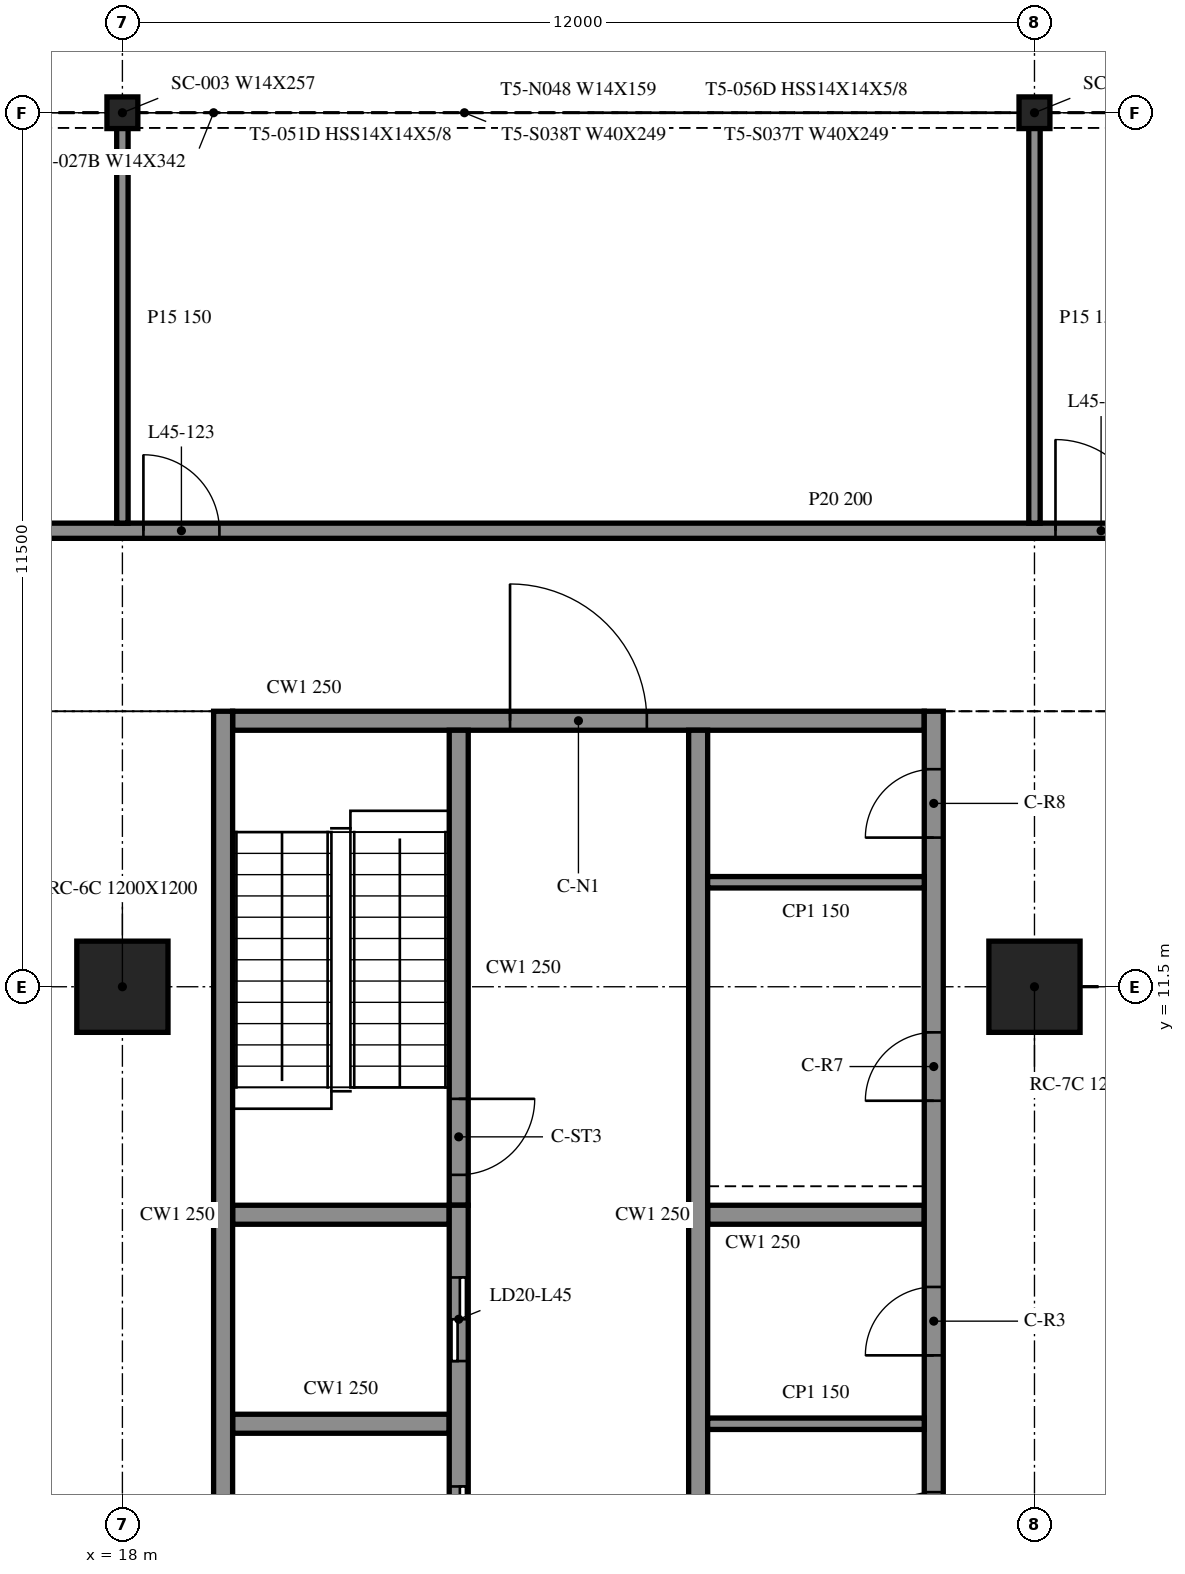
"""IFC4 building model, lengths in metres.
Left out: names, types, materials, properties, quantities, classifications, styles, units other than length and angle.
Written with IfcOpenShell. Run it as: python <this file> out.ifc"""

import sys

from ifc_helpers import new_model, si_unit, direction, frame, frame_2d, origin, origin_2d, place, context, subcontext, project, spatial, rectangle, i_section, extrude, element, fill, save


model = new_model("IFC4")
c1 = context("Model", 3, precision=1e-05, world=origin(), true_north=direction((0.0, 1.0)))
c2 = subcontext(c1, "Body", "Model", "MODEL_VIEW")
j1 = project(units=[si_unit("LENGTHUNIT", "METRE"), si_unit("PLANEANGLEUNIT", "RADIAN")], contexts=[c1])
p1 = place(None, origin())
s1 = spatial("IfcSite", under=j1, at=p1, CompositionType="ELEMENT")
p2 = place(p1, origin())
s2 = spatial("IfcBuilding", under=s1, at=p2, CompositionType="ELEMENT")
p3 = place(p2, frame((0.0, 0.0, 189.6)))
s3 = spatial("IfcBuildingStorey", under=s2, at=p3, CompositionType="ELEMENT", Elevation=189.6)
for number, where, z_axis, x_axis in (
    (1, (18.0, 11.5, -0.4), (0.0, 0.0, 1.0), (1.0, 0.0, 0.0)),
    (2, (30.0, 11.5, -0.4), (0.0, 0.0, 1.0), (1.0, 0.0, 0.0)),
):
    element("IfcColumn", number, at=place(p3, frame(where, z_axis=z_axis, x_axis=x_axis)), inside=s3, PredefinedType="COLUMN", context=c2, shape_type="SweptSolid", body=[
        extrude(rectangle(XDim=1.2, YDim=1.2, at=origin_2d()), origin(), (0.0, 0.0, 1.0), 4.36),
    ])
for number, where, z_axis, x_axis in (
    (3, (30.0, 23.0, -0.4), (0.0, 0.0, 1.0), (1.0, 0.0, 0.0)),
    (4, (18.0, 23.0, -0.4), (0.0, 0.0, 1.0), (1.0, 0.0, 0.0)),
):
    element("IfcColumn", number, at=place(p3, frame(where, z_axis=z_axis, x_axis=x_axis)), inside=s3, PredefinedType="COLUMN", context=c2, shape_type="SweptSolid", body=[
        extrude(i_section(OverallWidth=0.406, OverallDepth=0.417, WebThickness=0.03, FlangeThickness=0.048, at=origin_2d()), origin(), (0.0, 0.0, 1.0), 4.36),
    ])
p4 = place(p3, frame((19.325, 15.125, 0.0), z_axis=(0.0, 0.0, 1.0), x_axis=(0.0, -1.0, 0.0)))
e5 = element("IfcWall", 5, at=p4, inside=s3, PredefinedType="SOLIDWALL", context=c2, shape_type="SweptSolid", body=[
    extrude(rectangle(XDim=24.25, YDim=0.25, at=frame_2d((12.125, 0.0))), origin(), (0.0, 0.0, 1.0), 3.96),
])
p5 = place(p3, frame((28.675, -9.125, 0.0), z_axis=(0.0, 0.0, 1.0), x_axis=(0.0, 1.0, 0.0)))
e6 = element("IfcWall", 6, at=p5, inside=s3, PredefinedType="SOLIDWALL", context=c2, shape_type="SweptSolid", body=[
    extrude(rectangle(XDim=24.25, YDim=0.25, at=frame_2d((12.125, 0.0))), origin(), (0.0, 0.0, 1.0), 3.96),
])
p6 = place(p5, frame((13.075, 0.0, 0.0)))
e7 = element("IfcOpeningElement", 7, at=p6, cuts=e6, PredefinedType="OPENING", context=c2, shape_type="SweptSolid", body=[
    extrude(rectangle(XDim=0.9, YDim=2.1, at=frame_2d((0.45, 1.05))), frame((0.0, 0.135, 0.0), z_axis=(0.0, -1.0, 0.0), x_axis=(1.0, 0.0, 0.0)), (0.0, 0.0, 1.0), 0.27),
])
p7 = place(p5, frame((15.775, 0.0, 0.0)))
e8 = element("IfcOpeningElement", 8, at=p7, cuts=e6, PredefinedType="OPENING", context=c2, shape_type="SweptSolid", body=[
    extrude(rectangle(XDim=0.9, YDim=2.1, at=frame_2d((0.45, 1.05))), frame((0.0, 0.135, 0.0), z_axis=(0.0, -1.0, 0.0), x_axis=(1.0, 0.0, 0.0)), (0.0, 0.0, 1.0), 0.27),
])
p8 = place(p5, frame((19.125, 0.0, 0.0)))
e9 = element("IfcOpeningElement", 9, at=p8, cuts=e6, PredefinedType="OPENING", context=c2, shape_type="SweptSolid", body=[
    extrude(rectangle(XDim=0.9, YDim=2.1, at=frame_2d((0.45, 1.05))), frame((0.0, 0.135, 0.0), z_axis=(0.0, -1.0, 0.0), x_axis=(1.0, 0.0, 0.0)), (0.0, 0.0, 1.0), 0.27),
])
p9 = place(p5, frame((22.587, 0.0, 0.0)))
e10 = element("IfcOpeningElement", 10, at=p9, cuts=e6, PredefinedType="OPENING", context=c2, shape_type="SweptSolid", body=[
    extrude(rectangle(XDim=0.9, YDim=2.1, at=frame_2d((0.45, 1.05))), frame((0.0, 0.135, 0.0), z_axis=(0.0, -1.0, 0.0), x_axis=(1.0, 0.0, 0.0)), (0.0, 0.0, 1.0), 0.27),
])
p10 = place(p3, frame((19.45, 15.0, 0.0), z_axis=(0.0, 0.0, 1.0), x_axis=(1.0, 0.0, 0.0)))
e11 = element("IfcWall", 11, at=p10, inside=s3, PredefinedType="SOLIDWALL", context=c2, shape_type="SweptSolid", body=[
    extrude(rectangle(XDim=9.1, YDim=0.25, at=frame_2d((4.55, 0.0))), origin(), (0.0, 0.0, 1.0), 3.96),
])
p11 = place(p10, frame((3.65, 0.0, 0.0)))
e12 = element("IfcOpeningElement", 12, at=p11, cuts=e11, PredefinedType="OPENING", context=c2, shape_type="SweptSolid", body=[
    extrude(rectangle(XDim=1.8, YDim=2.1, at=frame_2d((0.9, 1.05))), frame((0.0, 0.135, 0.0), z_axis=(0.0, -1.0, 0.0), x_axis=(1.0, 0.0, 0.0)), (0.0, 0.0, 1.0), 0.27),
])
p12 = place(p3, frame((22.425, -8.875, 0.0), z_axis=(0.0, 0.0, 1.0), x_axis=(0.0, 1.0, 0.0)))
e13 = element("IfcWall", 13, at=p12, inside=s3, PredefinedType="SOLIDWALL", context=c2, shape_type="SweptSolid", body=[
    extrude(rectangle(XDim=17.5, YDim=0.25, at=frame_2d((8.75, 0.0))), origin(), (0.0, 0.0, 1.0), 3.96),
])
p13 = place(p12, frame((7.2, 0.0, 0.0)))
e14 = element("IfcOpeningElement", 14, at=p13, cuts=e13, PredefinedType="OPENING", context=c2, shape_type="SweptSolid", body=[
    extrude(rectangle(XDim=1.1, YDim=2.1, at=frame_2d((0.55, 1.05))), frame((0.0, 0.135, 0.0), z_axis=(0.0, -1.0, 0.0), x_axis=(1.0, 0.0, 0.0)), (0.0, 0.0, 1.0), 0.27),
])
p14 = place(p12, frame((9.95, 0.0, 0.0)))
e15 = element("IfcOpeningElement", 15, at=p14, cuts=e13, PredefinedType="OPENING", context=c2, shape_type="SweptSolid", body=[
    extrude(rectangle(XDim=1.1, YDim=2.1, at=frame_2d((0.55, 1.05))), frame((0.0, 0.135, 0.0), z_axis=(0.0, -1.0, 0.0), x_axis=(1.0, 0.0, 0.0)), (0.0, 0.0, 1.0), 0.27),
])
p15 = place(p12, frame((12.7, 0.0, 0.0)))
e16 = element("IfcOpeningElement", 16, at=p15, cuts=e13, PredefinedType="OPENING", context=c2, shape_type="SweptSolid", body=[
    extrude(rectangle(XDim=1.1, YDim=2.1, at=frame_2d((0.55, 1.05))), frame((0.0, 0.135, 0.0), z_axis=(0.0, -1.0, 0.0), x_axis=(1.0, 0.0, 0.0)), (0.0, 0.0, 1.0), 0.27),
])
p16 = place(p12, frame((15.45, 0.0, 0.0)))
e17 = element("IfcOpeningElement", 17, at=p16, cuts=e13, PredefinedType="OPENING", context=c2, shape_type="SweptSolid", body=[
    extrude(rectangle(XDim=1.1, YDim=2.1, at=frame_2d((0.55, 1.05))), frame((0.0, 0.135, 0.0), z_axis=(0.0, -1.0, 0.0), x_axis=(1.0, 0.0, 0.0)), (0.0, 0.0, 1.0), 0.27),
])
p17 = place(p12, frame((0.512, 0.0, 0.0)))
e18 = element("IfcOpeningElement", 18, at=p17, cuts=e13, PredefinedType="OPENING", context=c2, shape_type="SweptSolid", body=[
    extrude(rectangle(XDim=0.9, YDim=2.1, at=frame_2d((0.45, 1.05))), frame((0.0, 0.135, 0.0), z_axis=(0.0, -1.0, 0.0), x_axis=(1.0, 0.0, 0.0)), (0.0, 0.0, 1.0), 0.27),
])
p18 = place(p12, frame((2.55, 0.0, 0.0)))
e19 = element("IfcOpeningElement", 19, at=p18, cuts=e13, PredefinedType="OPENING", context=c2, shape_type="SweptSolid", body=[
    extrude(rectangle(XDim=0.9, YDim=2.1, at=frame_2d((0.45, 1.05))), frame((0.0, 0.135, 0.0), z_axis=(0.0, -1.0, 0.0), x_axis=(1.0, 0.0, 0.0)), (0.0, 0.0, 1.0), 0.27),
])
p19 = place(p12, frame((4.587, 0.0, 0.0)))
e20 = element("IfcOpeningElement", 20, at=p19, cuts=e13, PredefinedType="OPENING", context=c2, shape_type="SweptSolid", body=[
    extrude(rectangle(XDim=0.9, YDim=2.1, at=frame_2d((0.45, 1.05))), frame((0.0, 0.135, 0.0), z_axis=(0.0, -1.0, 0.0), x_axis=(1.0, 0.0, 0.0)), (0.0, 0.0, 1.0), 0.27),
])
p20 = place(p3, frame((22.425, 14.875, 0.0), z_axis=(0.0, 0.0, 1.0), x_axis=(0.0, -1.0, 0.0)))
e21 = element("IfcWall", 21, at=p20, inside=s3, PredefinedType="SOLIDWALL", context=c2, shape_type="SweptSolid", body=[
    extrude(rectangle(XDim=6.25, YDim=0.25, at=frame_2d((3.125, 0.0))), origin(), (0.0, 0.0, 1.0), 3.96),
])
p21 = place(p20, frame((4.85, 0.0, 0.0)))
e22 = element("IfcOpeningElement", 22, at=p21, cuts=e21, PredefinedType="OPENING", context=c2, shape_type="SweptSolid", body=[
    extrude(rectangle(XDim=1.0, YDim=2.1, at=frame_2d((0.5, 1.05))), frame((0.0, 0.135, 0.0), z_axis=(0.0, -1.0, 0.0), x_axis=(1.0, 0.0, 0.0)), (0.0, 0.0, 1.0), 0.27),
])
p22 = place(p3, frame((25.575, 14.875, 0.0), z_axis=(0.0, 0.0, 1.0), x_axis=(0.0, -1.0, 0.0)))
e23 = element("IfcWall", 23, at=p22, inside=s3, PredefinedType="SOLIDWALL", context=c2, shape_type="SweptSolid", body=[
    extrude(rectangle(XDim=17.5, YDim=0.25, at=frame_2d((8.75, 0.0))), origin(), (0.0, 0.0, 1.0), 3.96),
])
p23 = place(p22, frame((15.45, 0.0, 0.0)))
e24 = element("IfcOpeningElement", 24, at=p23, cuts=e23, PredefinedType="OPENING", context=c2, shape_type="SweptSolid", body=[
    extrude(rectangle(XDim=1.1, YDim=2.1, at=frame_2d((0.55, 1.05))), frame((0.0, 0.135, 0.0), z_axis=(0.0, -1.0, 0.0), x_axis=(1.0, 0.0, 0.0)), (0.0, 0.0, 1.0), 0.27),
])
p24 = place(p22, frame((12.8, 0.0, 0.0)))
e25 = element("IfcOpeningElement", 25, at=p24, cuts=e23, PredefinedType="OPENING", context=c2, shape_type="SweptSolid", body=[
    extrude(rectangle(XDim=0.9, YDim=2.1, at=frame_2d((0.45, 1.05))), frame((0.0, 0.135, 0.0), z_axis=(0.0, -1.0, 0.0), x_axis=(1.0, 0.0, 0.0)), (0.0, 0.0, 1.0), 0.27),
])
for number, where, z_axis, x_axis in (
    (26, (19.45, 5.75, 0.0), (0.0, 0.0, 1.0), (1.0, 0.0, 0.0)),
    (27, (19.45, 8.5, 0.0), (0.0, 0.0, 1.0), (1.0, 0.0, 0.0)),
    (28, (25.7, 8.5, 0.0), (0.0, 0.0, 1.0), (1.0, 0.0, 0.0)),
):
    element("IfcWall", number, at=place(p3, frame(where, z_axis=z_axis, x_axis=x_axis)), inside=s3, PredefinedType="SOLIDWALL", context=c2, shape_type="SweptSolid", body=[
        extrude(rectangle(XDim=2.85, YDim=0.25, at=frame_2d((1.425, 0.0))), origin(), (0.0, 0.0, 1.0), 3.96),
    ])
for number, where, z_axis, x_axis in (
    (29, (25.7, 5.75, 0.0), (0.0, 0.0, 1.0), (1.0, 0.0, 0.0)),
    (30, (25.7, 12.875, 0.0), (0.0, 0.0, 1.0), (1.0, 0.0, 0.0)),
):
    element("IfcWall", number, at=place(p3, frame(where, z_axis=z_axis, x_axis=x_axis)), inside=s3, PredefinedType="PARTITIONING", context=c2, shape_type="SweptSolid", body=[
        extrude(rectangle(XDim=2.85, YDim=0.15, at=frame_2d((1.425, 0.0))), origin(), (0.0, 0.0, 1.0), 3.96),
    ])
p25 = place(p3, frame((-40.624, 17.5, 0.0), z_axis=(0.0, 0.0, 1.0), x_axis=(1.0, 0.0, 0.0)))
e31 = element("IfcWall", 31, at=p25, inside=s3, PredefinedType="PARTITIONING", context=c2, shape_type="SweptSolid", body=[
    extrude(rectangle(XDim=94.524, YDim=0.2, at=frame_2d((47.262, 0.0))), origin(), (0.0, 0.0, 1.0), 3.96),
])
p26 = place(p25, frame((9.1, 0.0, 0.0)))
e32 = element("IfcOpeningElement", 32, at=p26, cuts=e31, PredefinedType="OPENING", context=c2, shape_type="SweptSolid", body=[
    extrude(rectangle(XDim=1.2, YDim=2.1, at=frame_2d((0.6, 1.05))), frame((0.0, 0.11, 0.0), z_axis=(0.0, -1.0, 0.0), x_axis=(1.0, 0.0, 0.0)), (0.0, 0.0, 1.0), 0.22),
])
p27 = place(p25, frame((21.1, 0.0, 0.0)))
e33 = element("IfcOpeningElement", 33, at=p27, cuts=e31, PredefinedType="OPENING", context=c2, shape_type="SweptSolid", body=[
    extrude(rectangle(XDim=1.2, YDim=2.1, at=frame_2d((0.6, 1.05))), frame((0.0, 0.11, 0.0), z_axis=(0.0, -1.0, 0.0), x_axis=(1.0, 0.0, 0.0)), (0.0, 0.0, 1.0), 0.22),
])
p28 = place(p25, frame((33.3, 0.0, 0.0)))
e34 = element("IfcOpeningElement", 34, at=p28, cuts=e31, PredefinedType="OPENING", context=c2, shape_type="SweptSolid", body=[
    extrude(rectangle(XDim=1.0, YDim=2.1, at=frame_2d((0.5, 1.05))), frame((0.0, 0.11, 0.0), z_axis=(0.0, -1.0, 0.0), x_axis=(1.0, 0.0, 0.0)), (0.0, 0.0, 1.0), 0.22),
])
p29 = place(p25, frame((45.5, 0.0, 0.0)))
e35 = element("IfcOpeningElement", 35, at=p29, cuts=e31, PredefinedType="OPENING", context=c2, shape_type="SweptSolid", body=[
    extrude(rectangle(XDim=0.9, YDim=2.1, at=frame_2d((0.45, 1.05))), frame((0.0, 0.11, 0.0), z_axis=(0.0, -1.0, 0.0), x_axis=(1.0, 0.0, 0.0)), (0.0, 0.0, 1.0), 0.22),
])
p30 = place(p25, frame((46.9, 0.0, 0.0)))
e36 = element("IfcOpeningElement", 36, at=p30, cuts=e31, PredefinedType="OPENING", context=c2, shape_type="SweptSolid", body=[
    extrude(rectangle(XDim=1.0, YDim=2.1, at=frame_2d((0.5, 1.05))), frame((0.0, 0.11, 0.0), z_axis=(0.0, -1.0, 0.0), x_axis=(1.0, 0.0, 0.0)), (0.0, 0.0, 1.0), 0.22),
])
p31 = place(p25, frame((58.9, 0.0, 0.0)))
e37 = element("IfcOpeningElement", 37, at=p31, cuts=e31, PredefinedType="OPENING", context=c2, shape_type="SweptSolid", body=[
    extrude(rectangle(XDim=1.0, YDim=2.1, at=frame_2d((0.5, 1.05))), frame((0.0, 0.11, 0.0), z_axis=(0.0, -1.0, 0.0), x_axis=(1.0, 0.0, 0.0)), (0.0, 0.0, 1.0), 0.22),
])
p32 = place(p25, frame((70.9, 0.0, 0.0)))
e38 = element("IfcOpeningElement", 38, at=p32, cuts=e31, PredefinedType="OPENING", context=c2, shape_type="SweptSolid", body=[
    extrude(rectangle(XDim=1.2, YDim=2.1, at=frame_2d((0.6, 1.05))), frame((0.0, 0.11, 0.0), z_axis=(0.0, -1.0, 0.0), x_axis=(1.0, 0.0, 0.0)), (0.0, 0.0, 1.0), 0.22),
])
p33 = place(p25, frame((82.9, 0.0, 0.0)))
e39 = element("IfcOpeningElement", 39, at=p33, cuts=e31, PredefinedType="OPENING", context=c2, shape_type="SweptSolid", body=[
    extrude(rectangle(XDim=1.2, YDim=2.1, at=frame_2d((0.6, 1.05))), frame((0.0, 0.11, 0.0), z_axis=(0.0, -1.0, 0.0), x_axis=(1.0, 0.0, 0.0)), (0.0, 0.0, 1.0), 0.22),
])
for number, where, z_axis, x_axis in (
    (40, (18.0, 17.6, 0.0), (0.0, 0.0, 1.0), (0.0, 1.0, 0.0)),
    (41, (30.0, 17.6, 0.0), (0.0, 0.0, 1.0), (0.0, 1.0, 0.0)),
):
    element("IfcWall", number, at=place(p3, frame(where, z_axis=z_axis, x_axis=x_axis)), inside=s3, PredefinedType="PARTITIONING", context=c2, shape_type="SweptSolid", body=[
        extrude(rectangle(XDim=5.4, YDim=0.15, at=frame_2d((2.7, 0.0))), origin(), (0.0, 0.0, 1.0), 3.96),
    ])
p34 = place(p11, origin())
e42 = element("IfcDoor", 42, at=p34, inside=s3, OperationType="DOUBLE_DOOR_SINGLE_SWING", PredefinedType="DOOR", context=c2, shape_type="SweptSolid", body=[
    extrude(rectangle(XDim=1.8, YDim=2.1, at=frame_2d((0.9, 1.05))), frame((0.0, 0.025, 0.0), z_axis=(0.0, -1.0, 0.0), x_axis=(1.0, 0.0, 0.0)), (0.0, 0.0, 1.0), 0.05),
])
fill(e12, e42)
p35 = place(p15, origin())
e43 = element("IfcDoor", 43, at=p35, inside=s3, OperationType="DOUBLE_DOOR_SLIDING", PredefinedType="DOOR", context=c2, shape_type="SweptSolid", body=[
    extrude(rectangle(XDim=1.1, YDim=2.1, at=frame_2d((0.55, 1.05))), frame((0.0, 0.025, 0.0), z_axis=(0.0, -1.0, 0.0), x_axis=(1.0, 0.0, 0.0)), (0.0, 0.0, 1.0), 0.05),
])
fill(e16, e43)
p36 = place(p16, origin())
e44 = element("IfcDoor", 44, at=p36, inside=s3, OperationType="DOUBLE_DOOR_SLIDING", PredefinedType="DOOR", context=c2, shape_type="SweptSolid", body=[
    extrude(rectangle(XDim=1.1, YDim=2.1, at=frame_2d((0.55, 1.05))), frame((0.0, 0.025, 0.0), z_axis=(0.0, -1.0, 0.0), x_axis=(1.0, 0.0, 0.0)), (0.0, 0.0, 1.0), 0.05),
])
fill(e17, e44)
p37 = place(p6, origin())
e45 = element("IfcDoor", 45, at=p37, inside=s3, OperationType="SINGLE_SWING_RIGHT", PredefinedType="DOOR", context=c2, shape_type="SweptSolid", body=[
    extrude(rectangle(XDim=0.9, YDim=2.1, at=frame_2d((0.45, 1.05))), frame((0.0, 0.025, 0.0), z_axis=(0.0, -1.0, 0.0), x_axis=(1.0, 0.0, 0.0)), (0.0, 0.0, 1.0), 0.05),
])
fill(e7, e45)
p38 = place(p7, origin())
e46 = element("IfcDoor", 46, at=p38, inside=s3, OperationType="SINGLE_SWING_LEFT", PredefinedType="DOOR", context=c2, shape_type="SweptSolid", body=[
    extrude(rectangle(XDim=0.9, YDim=2.1, at=frame_2d((0.45, 1.05))), frame((0.0, 0.025, 0.0), z_axis=(0.0, -1.0, 0.0), x_axis=(1.0, 0.0, 0.0)), (0.0, 0.0, 1.0), 0.05),
])
fill(e8, e46)
p39 = place(p8, origin())
e47 = element("IfcDoor", 47, at=p39, inside=s3, OperationType="SINGLE_SWING_LEFT", PredefinedType="DOOR", context=c2, shape_type="SweptSolid", body=[
    extrude(rectangle(XDim=0.9, YDim=2.1, at=frame_2d((0.45, 1.05))), frame((0.0, 0.025, 0.0), z_axis=(0.0, -1.0, 0.0), x_axis=(1.0, 0.0, 0.0)), (0.0, 0.0, 1.0), 0.05),
])
fill(e9, e47)
p40 = place(p9, origin())
e48 = element("IfcDoor", 48, at=p40, inside=s3, OperationType="SINGLE_SWING_RIGHT", PredefinedType="DOOR", context=c2, shape_type="SweptSolid", body=[
    extrude(rectangle(XDim=0.9, YDim=2.1, at=frame_2d((0.45, 1.05))), frame((0.0, 0.025, 0.0), z_axis=(0.0, -1.0, 0.0), x_axis=(1.0, 0.0, 0.0)), (0.0, 0.0, 1.0), 0.05),
])
fill(e10, e48)
p41 = place(p21, origin())
e49 = element("IfcDoor", 49, at=p41, inside=s3, OperationType="SINGLE_SWING_LEFT", PredefinedType="DOOR", context=c2, shape_type="SweptSolid", body=[
    extrude(rectangle(XDim=1.0, YDim=2.1, at=frame_2d((0.5, 1.05))), frame((0.0, 0.025, 0.0), z_axis=(0.0, -1.0, 0.0), x_axis=(1.0, 0.0, 0.0)), (0.0, 0.0, 1.0), 0.05),
])
fill(e22, e49)
p42 = place(p31, origin())
e50 = element("IfcDoor", 50, at=p42, inside=s3, OperationType="SINGLE_SWING_RIGHT", PredefinedType="DOOR", context=c2, shape_type="SweptSolid", body=[
    extrude(rectangle(XDim=1.0, YDim=2.1, at=frame_2d((0.5, 1.05))), frame((0.0, 0.025, 0.0), z_axis=(0.0, -1.0, 0.0), x_axis=(1.0, 0.0, 0.0)), (0.0, 0.0, 1.0), 0.05),
])
fill(e37, e50)
p43 = place(p32, origin())
e51 = element("IfcDoor", 51, at=p43, inside=s3, OperationType="SINGLE_SWING_RIGHT", PredefinedType="DOOR", context=c2, shape_type="SweptSolid", body=[
    extrude(rectangle(XDim=1.2, YDim=2.1, at=frame_2d((0.6, 1.05))), frame((0.0, 0.025, 0.0), z_axis=(0.0, -1.0, 0.0), x_axis=(1.0, 0.0, 0.0)), (0.0, 0.0, 1.0), 0.05),
])
fill(e38, e51)
save(model, sys.argv[1])
